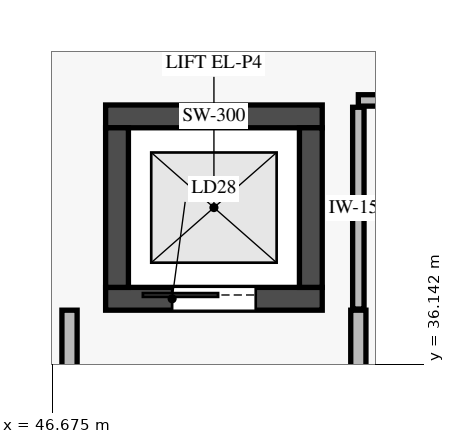
"""IFC4 building model, lengths in metres.
Left out: names, types, materials, properties, quantities, classifications, styles, units other than length and angle.
Written with IfcOpenShell. Run it as: python <this file> out.ifc"""

import sys

from ifc_helpers import new_model, si_unit, direction, frame, frame_2d, origin, place, context, subcontext, project, spatial, rectangle, extrude, element, fill, save


model = new_model("IFC4")
c1 = context("Model", 3, precision=1e-05, world=origin(), true_north=direction((0.0, 1.0)))
c2 = subcontext(c1, "Body", "Model", "MODEL_VIEW")
j1 = project(units=[si_unit("LENGTHUNIT", "METRE"), si_unit("PLANEANGLEUNIT", "RADIAN")], contexts=[c1])
p1 = place(None, origin())
s1 = spatial("IfcSite", under=j1, at=p1, CompositionType="ELEMENT")
p2 = place(p1, origin())
s2 = spatial("IfcBuilding", under=s1, at=p2, CompositionType="ELEMENT")
p3 = place(p2, frame((0.0, 0.0, 4.8)))
s3 = spatial("IfcBuildingStorey", under=s2, at=p3, CompositionType="ELEMENT", Elevation=4.8)
p4 = place(p3, frame((47.375, 37.0, 0.0), z_axis=(0.0, 0.0, 1.0), x_axis=(1.0, 0.0, 0.0)))
e1 = element("IfcWall", 1, at=p4, inside=s3, PredefinedType="SHEAR", context=c2, shape_type="SweptSolid", body=[
    extrude(rectangle(XDim=2.85, YDim=0.3, at=frame_2d((1.425, 0.0))), origin(), (0.0, 0.0, 1.0), 3.95),
])
p5 = place(p4, frame((0.875, 0.0, 0.0)))
e2 = element("IfcOpeningElement", 2, at=p5, cuts=e1, PredefinedType="OPENING", context=c2, shape_type="SweptSolid", body=[
    extrude(rectangle(XDim=1.1, YDim=2.15, at=frame_2d((0.55, 1.075))), frame((0.0, 0.16, 0.0), z_axis=(0.0, -1.0, 0.0), x_axis=(1.0, 0.0, 0.0)), (0.0, 0.0, 1.0), 0.32),
])
p6 = place(p3, frame((47.375, 39.4, 0.0), z_axis=(0.0, 0.0, 1.0), x_axis=(1.0, 0.0, 0.0)))
e3 = element("IfcWall", 3, at=p6, inside=s3, PredefinedType="SHEAR", context=c2, shape_type="SweptSolid", body=[
    extrude(rectangle(XDim=2.85, YDim=0.3, at=frame_2d((1.425, 0.0))), origin(), (0.0, 0.0, 1.0), 3.95),
])
for number, where, z_axis, x_axis in (
    (4, (47.525, 37.15, 0.0), (0.0, 0.0, 1.0), (0.0, 1.0, 0.0)),
    (5, (50.075, 37.15, 0.0), (0.0, 0.0, 1.0), (0.0, 1.0, 0.0)),
):
    element("IfcWall", number, at=place(p3, frame(where, z_axis=z_axis, x_axis=x_axis)), inside=s3, PredefinedType="SHEAR", context=c2, shape_type="SweptSolid", body=[
        extrude(rectangle(XDim=2.1, YDim=0.3, at=frame_2d((1.05, 0.0))), origin(), (0.0, 0.0, 1.0), 3.95),
    ])
p7 = place(p3, frame((50.7, 33.25, 0.0), z_axis=(0.0, 0.0, 1.0), x_axis=(0.0, 1.0, 0.0)))
e6 = element("IfcWall", 6, at=p7, inside=s3, PredefinedType="PARTITIONING", context=c2, shape_type="SweptSolid", body=[
    extrude(rectangle(XDim=3.6, YDim=0.2, at=frame_2d((1.8, 0.0))), origin(), (0.0, 0.0, 1.0), 3.44),
])
p8 = place(p3, frame((46.9, 33.365, 0.0), z_axis=(0.0, 0.0, 1.0), x_axis=(0.0, 1.0, 0.0)))
e7 = element("IfcWall", 7, at=p8, inside=s3, PredefinedType="PARTITIONING", context=c2, shape_type="SweptSolid", body=[
    extrude(rectangle(XDim=3.485, YDim=0.2, at=frame_2d((1.743, 0.0))), origin(), (0.0, 0.0, 1.0), 3.44),
])
p9 = place(p3, frame((50.7, 39.61, 0.0), z_axis=(0.0, 0.0, 1.0), x_axis=(1.0, 0.0, 0.0)))
e8 = element("IfcWall", 8, at=p9, inside=s3, PredefinedType="PARTITIONING", context=c2, shape_type="SweptSolid", body=[
    extrude(rectangle(XDim=1.685, YDim=0.15, at=frame_2d((0.843, 0.0))), origin(), (0.0, 0.0, 1.0), 3.95),
])
p10 = place(p3, frame((50.7, 36.865, 0.0), z_axis=(0.0, 0.0, 1.0), x_axis=(0.0, 1.0, 0.0)))
e9 = element("IfcWall", 9, at=p10, inside=s3, PredefinedType="PARTITIONING", context=c2, shape_type="SweptSolid", body=[
    extrude(rectangle(XDim=2.655, YDim=0.15, at=frame_2d((1.328, 0.0))), origin(), (0.0, 0.0, 1.0), 3.95),
])
p11 = place(p5, origin())
e10 = element("IfcDoor", 10, at=p11, inside=s3, OperationType="SLIDING_TO_LEFT", PredefinedType="DOOR", context=c2, shape_type="SweptSolid", body=[
    extrude(rectangle(XDim=1.1, YDim=2.15, at=frame_2d((0.55, 1.075))), frame((0.0, 0.025, 0.0), z_axis=(0.0, -1.0, 0.0), x_axis=(1.0, 0.0, 0.0)), (0.0, 0.0, 1.0), 0.05),
])
fill(e2, e10)
save(model, sys.argv[1])
